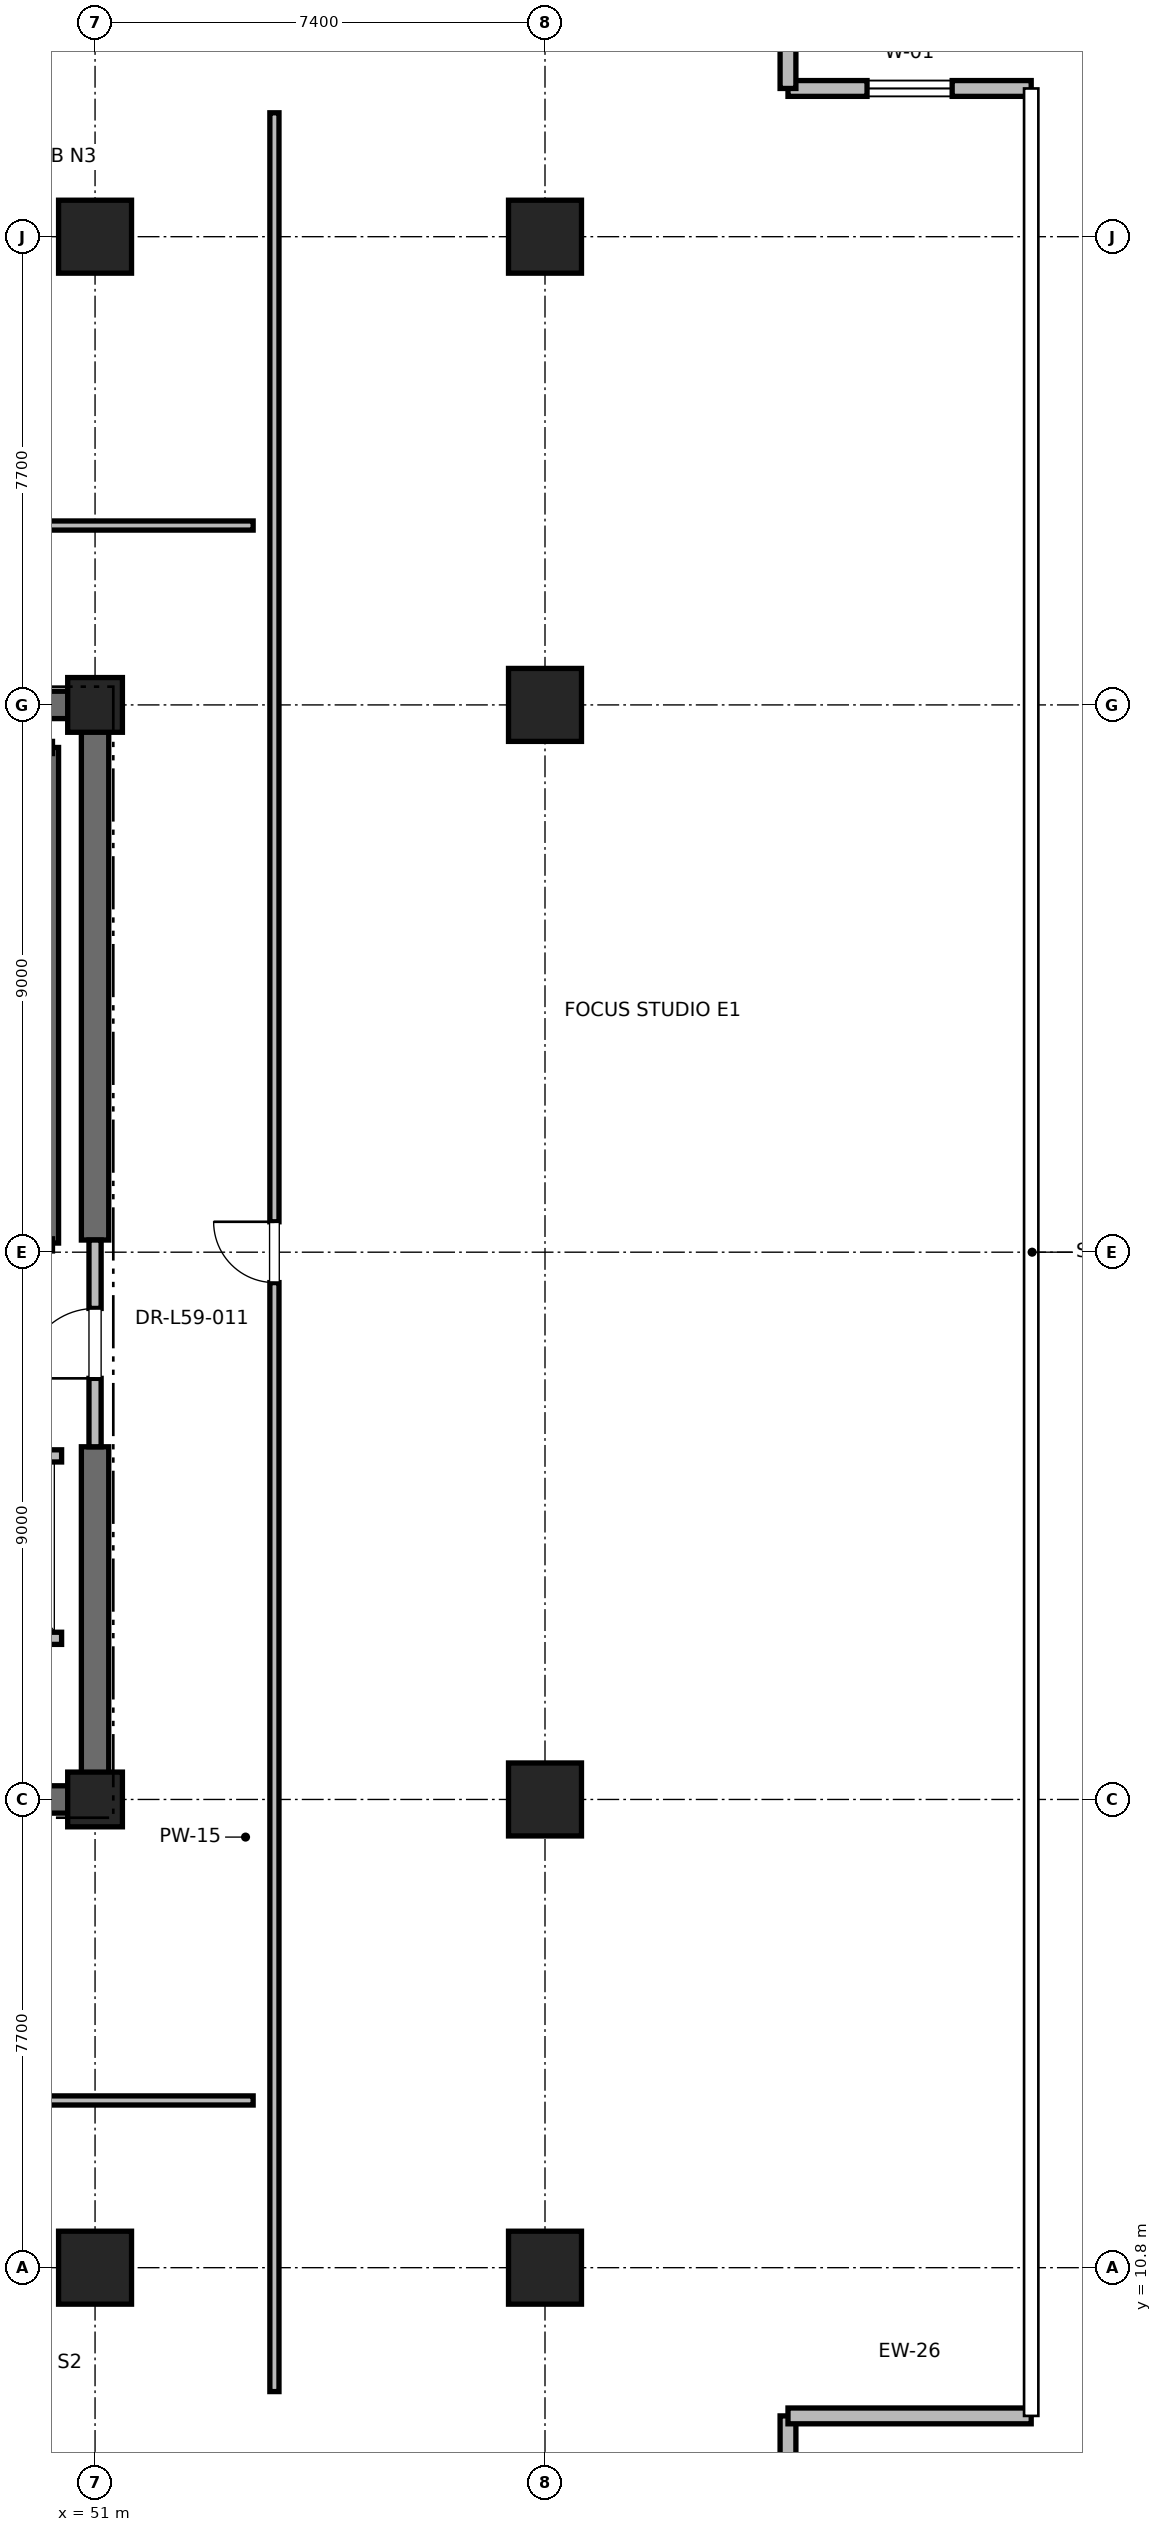
"""IFC4 building model, lengths in metres.
Left out: names, types, materials, properties, quantities, classifications, styles, units other than length and angle.
Written with IfcOpenShell. Run it as: python <this file> out.ifc"""

import sys

from ifc_helpers import new_model, si_unit, direction, frame, frame_2d, origin, origin_2d, place, context, subcontext, project, spatial, rectangle, extrude, element, fill, save


model = new_model("IFC4")
c1 = context("Model", 3, precision=1e-05, world=origin(), true_north=direction((0.0, 1.0)))
c2 = subcontext(c1, "Body", "Model", "MODEL_VIEW")
j1 = project(units=[si_unit("LENGTHUNIT", "METRE"), si_unit("PLANEANGLEUNIT", "RADIAN")], contexts=[c1])
p1 = place(None, origin())
s1 = spatial("IfcSite", under=j1, at=p1, CompositionType="ELEMENT")
p2 = place(p1, origin())
s2 = spatial("IfcBuilding", under=s1, at=p2, CompositionType="ELEMENT")
p3 = place(p2, frame((0.0, 0.0, 255.2)))
s3 = spatial("IfcBuildingStorey", under=s2, at=p3, CompositionType="ELEMENT", Elevation=255.2)
for number, where, z_axis, x_axis in (
    (1, (51.0, 10.8, 0.0), (0.0, 0.0, 1.0), (1.0, 0.0, 0.0)),
    (2, (51.0, 44.2, 0.0), (0.0, 0.0, 1.0), (1.0, 0.0, 0.0)),
    (3, (58.4, 18.5, 0.0), (0.0, 0.0, 1.0), (1.0, 0.0, 0.0)),
    (4, (58.4, 36.5, 0.0), (0.0, 0.0, 1.0), (1.0, 0.0, 0.0)),
    (5, (58.4, 10.8, 0.0), (0.0, 0.0, 1.0), (1.0, 0.0, 0.0)),
    (6, (58.4, 44.2, 0.0), (0.0, 0.0, 1.0), (1.0, 0.0, 0.0)),
):
    element("IfcColumn", number, at=place(p3, frame(where, z_axis=z_axis, x_axis=x_axis)), inside=s3, PredefinedType="COLUMN", context=c2, shape_type="SweptSolid", body=[
        extrude(rectangle(XDim=1.2, YDim=1.2, at=origin_2d()), origin(), (0.0, 0.0, 1.0), 4.0),
    ])
for number, where, z_axis, x_axis in (
    (7, (51.0, 18.5, 0.0), (0.0, 0.0, 1.0), (1.0, 0.0, 0.0)),
    (8, (51.0, 36.5, 0.0), (0.0, 0.0, 1.0), (1.0, 0.0, 0.0)),
):
    element("IfcColumn", number, at=place(p3, frame(where, z_axis=z_axis, x_axis=x_axis)), inside=s3, PredefinedType="PILASTER", context=c2, shape_type="SweptSolid", body=[
        extrude(rectangle(XDim=0.9, YDim=0.9, at=origin_2d()), origin(), (0.0, 0.0, 1.0), 4.0),
    ])
p4 = place(p3, frame((41.8, 18.5, 0.0), z_axis=(0.0, 0.0, 1.0), x_axis=(1.0, 0.0, 0.0)))
e9 = element("IfcWall", 9, at=p4, inside=s3, PredefinedType="SHEAR", context=c2, shape_type="SweptSolid", body=[
    extrude(rectangle(XDim=9.2, YDim=0.45, at=frame_2d((4.6, 0.0))), origin(), (0.0, 0.0, 1.0), 3.785),
])
for number, where, z_axis, x_axis in (
    (10, (45.2, 36.5, 0.0), (0.0, 0.0, 1.0), (1.0, 0.0, 0.0)),
    (11, (51.0, 18.5, 0.0), (0.0, 0.0, 1.0), (0.0, 1.0, 0.0)),
):
    element("IfcWall", number, at=place(p3, frame(where, z_axis=z_axis, x_axis=x_axis)), inside=s3, PredefinedType="SHEAR", context=c2, shape_type="SweptSolid", body=[
        extrude(rectangle(XDim=5.8, YDim=0.45, at=frame_2d((2.9, 0.0))), origin(), (0.0, 0.0, 1.0), 3.785),
    ])
p5 = place(p3, frame((51.0, 27.7, 0.0), z_axis=(0.0, 0.0, 1.0), x_axis=(0.0, 1.0, 0.0)))
e12 = element("IfcWall", 12, at=p5, inside=s3, PredefinedType="SHEAR", context=c2, shape_type="SweptSolid", body=[
    extrude(rectangle(XDim=8.8, YDim=0.45, at=frame_2d((4.4, 0.0))), origin(), (0.0, 0.0, 1.0), 3.785),
])
p6 = place(p3, frame((62.396, 4.862, 0.0), z_axis=(0.0, 0.0, 1.0), x_axis=(0.0, 1.0, 0.0)))
e13 = element("IfcWall", 13, at=p6, inside=s3, PredefinedType="PARAPET", context=c2, shape_type="SweptSolid", body=[
    extrude(rectangle(XDim=3.5, YDim=0.26, at=frame_2d((1.75, 0.0))), origin(), (0.0, 0.0, 1.0), 3.785),
])
p7 = place(p6, frame((1.05, 0.0, 0.85)))
e14 = element("IfcOpeningElement", 14, at=p7, cuts=e13, PredefinedType="OPENING", context=c2, shape_type="SweptSolid", body=[
    extrude(rectangle(XDim=1.4, YDim=2.0, at=frame_2d((0.7, 1.0))), frame((0.0, 0.13, 0.0), z_axis=(0.0, -1.0, 0.0), x_axis=(1.0, 0.0, 0.0)), (0.0, 0.0, 1.0), 0.26),
])
p8 = place(p3, frame((62.396, 8.362, 0.0), z_axis=(0.0, 0.0, 1.0), x_axis=(1.0, 0.0, 0.0)))
e15 = element("IfcWall", 15, at=p8, inside=s3, PredefinedType="PARAPET", context=c2, shape_type="SweptSolid", body=[
    extrude(rectangle(XDim=4.0, YDim=0.26, at=frame_2d((2.0, 0.0))), origin(), (0.0, 0.0, 1.0), 3.785),
])
p9 = place(p3, frame((66.396, 46.638, 0.0), z_axis=(0.0, 0.0, 1.0), x_axis=(-1.0, 0.0, 0.0)))
e16 = element("IfcWall", 16, at=p9, inside=s3, PredefinedType="PARAPET", context=c2, shape_type="SweptSolid", body=[
    extrude(rectangle(XDim=4.0, YDim=0.26, at=frame_2d((2.0, 0.0))), origin(), (0.0, 0.0, 1.0), 3.785),
])
p10 = place(p9, frame((1.3, 0.0, 0.85)))
e17 = element("IfcOpeningElement", 17, at=p10, cuts=e16, PredefinedType="OPENING", context=c2, shape_type="SweptSolid", body=[
    extrude(rectangle(XDim=1.4, YDim=2.0, at=frame_2d((0.7, 1.0))), frame((0.0, 0.13, 0.0), z_axis=(0.0, -1.0, 0.0), x_axis=(1.0, 0.0, 0.0)), (0.0, 0.0, 1.0), 0.26),
])
p11 = place(p3, frame((62.396, 46.638, 0.0), z_axis=(0.0, 0.0, 1.0), x_axis=(0.0, 1.0, 0.0)))
e18 = element("IfcWall", 18, at=p11, inside=s3, PredefinedType="PARAPET", context=c2, shape_type="SweptSolid", body=[
    extrude(rectangle(XDim=3.5, YDim=0.26, at=frame_2d((1.75, 0.0))), origin(), (0.0, 0.0, 1.0), 3.785),
])
p12 = place(p3, frame((50.3, 27.65, 0.0), z_axis=(0.0, 0.0, 1.0), x_axis=(0.0, 1.0, 0.0)))
e19 = element("IfcWall", 19, at=p12, inside=s3, PredefinedType="SOLIDWALL", context=c2, shape_type="SweptSolid", body=[
    extrude(rectangle(XDim=8.15, YDim=0.2, at=frame_2d((4.075, 0.0))), origin(), (0.0, 0.0, 1.0), 3.785),
])
p13 = place(p3, frame((51.0, 24.3, 0.0), z_axis=(0.0, 0.0, 1.0), x_axis=(0.0, 1.0, 0.0)))
e20 = element("IfcWall", 20, at=p13, inside=s3, PredefinedType="PARTITIONING", context=c2, shape_type="SweptSolid", body=[
    extrude(rectangle(XDim=3.4, YDim=0.2, at=frame_2d((1.7, 0.0))), origin(), (0.0, 0.0, 1.0), 2.865),
])
p14 = place(p13, frame((1.125, 0.0, 0.0)))
e21 = element("IfcOpeningElement", 21, at=p14, cuts=e20, PredefinedType="OPENING", context=c2, shape_type="SweptSolid", body=[
    extrude(rectangle(XDim=1.15, YDim=2.2, at=frame_2d((0.575, 1.1))), frame((0.0, 0.1, 0.0), z_axis=(0.0, -1.0, 0.0), x_axis=(1.0, 0.0, 0.0)), (0.0, 0.0, 1.0), 0.2),
])
p15 = place(p3, frame((47.85, 21.15, 0.0), z_axis=(0.0, 0.0, 1.0), x_axis=(1.0, 0.0, 0.0)))
e22 = element("IfcWall", 22, at=p15, inside=s3, PredefinedType="SOLIDWALL", context=c2, shape_type="SweptSolid", body=[
    extrude(rectangle(XDim=2.6, YDim=0.2, at=frame_2d((1.3, 0.0))), origin(), (0.0, 0.0, 1.0), 3.785),
])
p16 = place(p3, frame((50.45, 24.15, 0.0), z_axis=(0.0, 0.0, 1.0), x_axis=(-1.0, 0.0, 0.0)))
e23 = element("IfcWall", 23, at=p16, inside=s3, PredefinedType="SOLIDWALL", context=c2, shape_type="SweptSolid", body=[
    extrude(rectangle(XDim=2.6, YDim=0.2, at=frame_2d((1.3, 0.0))), origin(), (0.0, 0.0, 1.0), 2.865),
])
p17 = place(p16, frame((0.75, 0.0, 0.0)))
e24 = element("IfcOpeningElement", 24, at=p17, cuts=e23, PredefinedType="OPENING", context=c2, shape_type="SweptSolid", body=[
    extrude(rectangle(XDim=1.1, YDim=2.2, at=frame_2d((0.55, 1.1))), frame((0.0, 0.1, 0.0), z_axis=(0.0, -1.0, 0.0), x_axis=(1.0, 0.0, 0.0)), (0.0, 0.0, 1.0), 0.2),
])
p18 = place(p3, frame((44.422, 39.45, 0.0), z_axis=(0.0, 0.0, 1.0), x_axis=(1.0, 0.0, 0.0)))
e25 = element("IfcWall", 25, at=p18, inside=s3, PredefinedType="PARTITIONING", context=c2, shape_type="SweptSolid", body=[
    extrude(rectangle(XDim=9.178, YDim=0.15, at=frame_2d((4.589, 0.0))), origin(), (0.0, 0.0, 1.0), 2.85),
])
p19 = place(p18, frame((4.039, 0.0, 0.0)))
e26 = element("IfcOpeningElement", 26, at=p19, cuts=e25, PredefinedType="OPENING", context=c2, shape_type="SweptSolid", body=[
    extrude(rectangle(XDim=1.0, YDim=2.15, at=frame_2d((0.5, 1.075))), frame((0.0, 0.075, 0.0), z_axis=(0.0, -1.0, 0.0), x_axis=(1.0, 0.0, 0.0)), (0.0, 0.0, 1.0), 0.15),
])
p20 = place(p3, frame((38.71, 13.55, 0.0), z_axis=(0.0, 0.0, 1.0), x_axis=(1.0, 0.0, 0.0)))
e27 = element("IfcWall", 27, at=p20, inside=s3, PredefinedType="PARTITIONING", context=c2, shape_type="SweptSolid", body=[
    extrude(rectangle(XDim=14.89, YDim=0.15, at=frame_2d((7.445, 0.0))), origin(), (0.0, 0.0, 1.0), 2.85),
])
p21 = place(p20, frame((6.895, 0.0, 0.0)))
e28 = element("IfcOpeningElement", 28, at=p21, cuts=e27, PredefinedType="OPENING", context=c2, shape_type="SweptSolid", body=[
    extrude(rectangle(XDim=1.0, YDim=2.15, at=frame_2d((0.5, 1.075))), frame((0.0, 0.075, 0.0), z_axis=(0.0, -1.0, 0.0), x_axis=(1.0, 0.0, 0.0)), (0.0, 0.0, 1.0), 0.15),
])
p22 = place(p3, frame((53.95, 8.762, 0.0), z_axis=(0.0, 0.0, 1.0), x_axis=(0.0, 1.0, 0.0)))
e29 = element("IfcWall", 29, at=p22, inside=s3, PredefinedType="PARTITIONING", context=c2, shape_type="SweptSolid", body=[
    extrude(rectangle(XDim=37.475, YDim=0.15, at=frame_2d((18.738, 0.0))), origin(), (0.0, 0.0, 1.0), 2.85),
])
p23 = place(p22, frame((18.238, 0.0, 0.0)))
e30 = element("IfcOpeningElement", 30, at=p23, cuts=e29, PredefinedType="OPENING", context=c2, shape_type="SweptSolid", body=[
    extrude(rectangle(XDim=1.0, YDim=2.15, at=frame_2d((0.5, 1.075))), frame((0.0, 0.075, 0.0), z_axis=(0.0, -1.0, 0.0), x_axis=(1.0, 0.0, 0.0)), (0.0, 0.0, 1.0), 0.15),
])
p24 = place(p10, origin())
e31 = element("IfcWindow", 31, at=p24, inside=s3, PartitioningType="SINGLE_PANEL", PredefinedType="WINDOW", context=c2, shape_type="SweptSolid", body=[
    extrude(rectangle(XDim=1.4, YDim=2.0, at=frame_2d((0.7, 1.0))), frame((0.0, 0.03, 0.0), z_axis=(0.0, -1.0, 0.0), x_axis=(1.0, 0.0, 0.0)), (0.0, 0.0, 1.0), 0.06),
])
fill(e17, e31)
p25 = place(p14, origin())
e32 = element("IfcDoor", 32, at=p25, inside=s3, OperationType="SINGLE_SWING_LEFT", PredefinedType="DOOR", context=c2, shape_type="SweptSolid", body=[
    extrude(rectangle(XDim=1.15, YDim=2.2, at=frame_2d((0.575, 1.1))), frame((0.0, 0.025, 0.0), z_axis=(0.0, -1.0, 0.0), x_axis=(1.0, 0.0, 0.0)), (0.0, 0.0, 1.0), 0.05),
])
fill(e21, e32)
p26 = place(p23, origin())
e33 = element("IfcDoor", 33, at=p26, inside=s3, OperationType="SINGLE_SWING_RIGHT", PredefinedType="DOOR", context=c2, shape_type="SweptSolid", body=[
    extrude(rectangle(XDim=1.0, YDim=2.15, at=frame_2d((0.5, 1.075))), frame((0.0, 0.025, 0.0), z_axis=(0.0, -1.0, 0.0), x_axis=(1.0, 0.0, 0.0)), (0.0, 0.0, 1.0), 0.05),
])
fill(e30, e33)
save(model, sys.argv[1])
